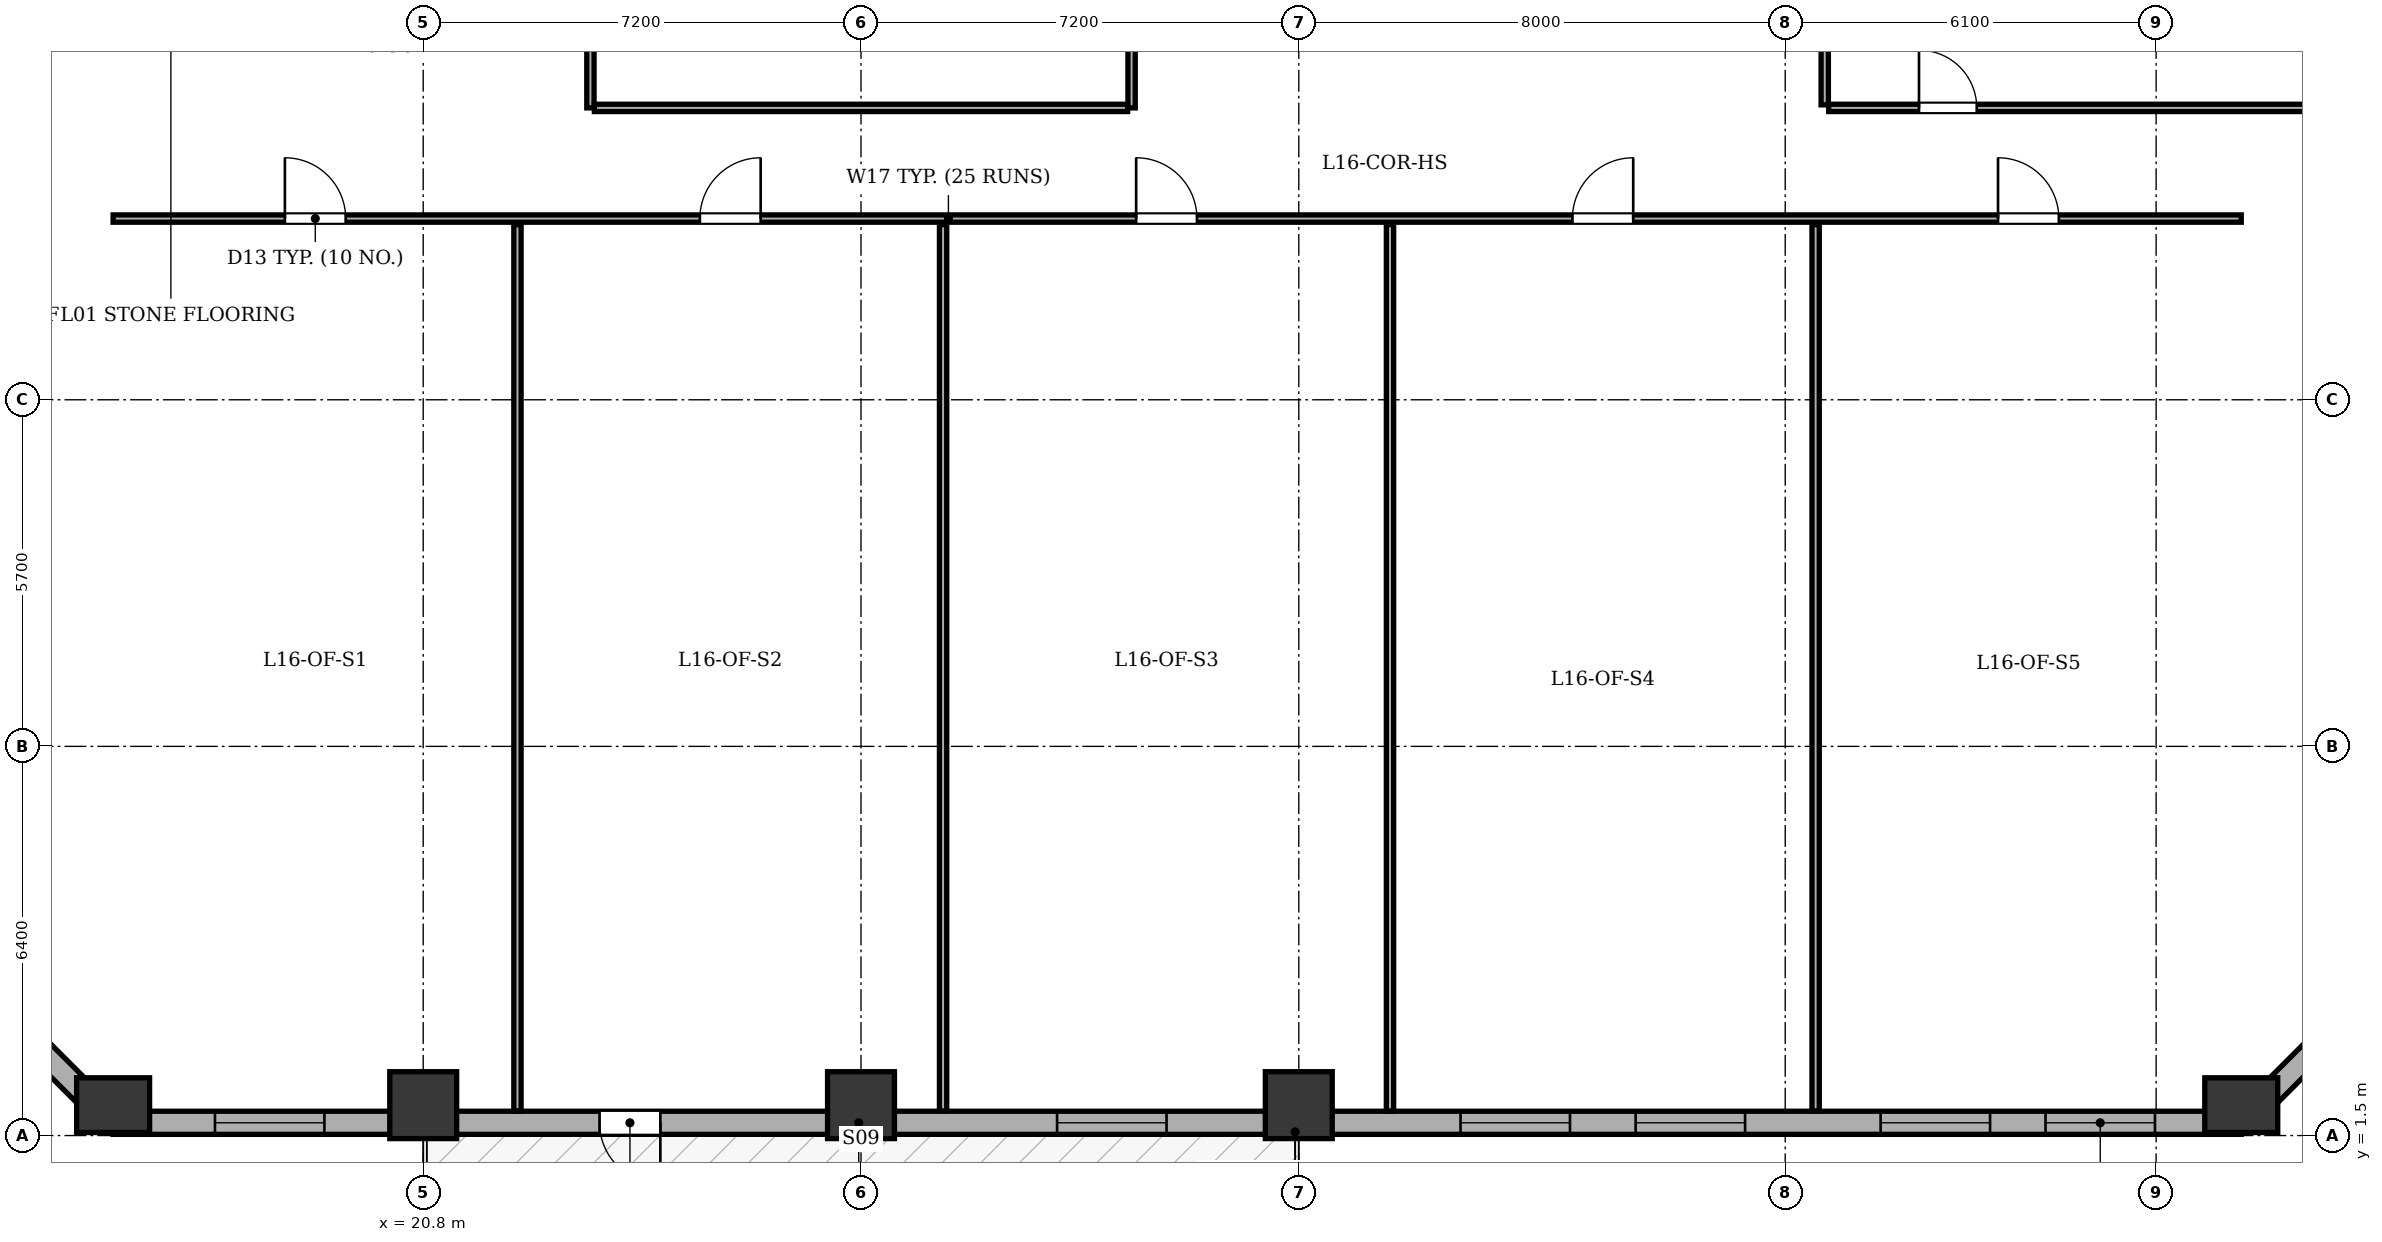
"""IFC4 building model, lengths in metres.
Left out: names, types, materials, properties, quantities, classifications, styles, units other than length and angle.
Written with IfcOpenShell. Run it as: python <this file> out.ifc"""

import sys

from ifc_helpers import new_model, si_unit, direction, frame, frame_2d, origin, origin_2d, place, context, subcontext, project, spatial, rectangle, extrude, element, fill, save


model = new_model("IFC4")
c1 = context("Model", 3, precision=1e-05, world=origin(), true_north=direction((0.0, 1.0)))
c2 = subcontext(c1, "Body", "Model", "MODEL_VIEW")
j1 = project(units=[si_unit("LENGTHUNIT", "METRE"), si_unit("PLANEANGLEUNIT", "RADIAN")], contexts=[c1])
p1 = place(None, origin())
s1 = spatial("IfcSite", under=j1, at=p1, CompositionType="ELEMENT")
p2 = place(p1, origin())
s2 = spatial("IfcBuilding", under=s1, at=p2, CompositionType="ELEMENT")
p3 = place(p2, frame((0.0, 0.0, 67.2)))
s3 = spatial("IfcBuildingStorey", under=s2, at=p3, CompositionType="ELEMENT", Elevation=67.2)
p4 = place(p3, frame((15.7, 2.0, 0.0), z_axis=(0.0, 0.0, 1.0), x_axis=(1.0, 0.0, 0.0)))
e1 = element("IfcColumn", 1, at=p4, inside=s3, PredefinedType="COLUMN", context=c2, shape_type="SweptSolid", body=[
    extrude(rectangle(XDim=0.9, YDim=1.2, at=origin_2d()), origin(), (0.0, 0.0, 1.0), 3.9),
])
for number, where, z_axis, x_axis in (
    (2, (20.8, 2.0, 0.0), (0.0, 0.0, 1.0), (1.0, 0.0, 0.0)),
    (3, (28.0, 2.0, 0.0), (0.0, 0.0, 1.0), (1.0, 0.0, 0.0)),
    (4, (35.2, 2.0, 0.0), (0.0, 0.0, 1.0), (1.0, 0.0, 0.0)),
):
    element("IfcColumn", number, at=place(p3, frame(where, z_axis=z_axis, x_axis=x_axis)), inside=s3, PredefinedType="COLUMN", context=c2, shape_type="SweptSolid", body=[
        extrude(rectangle(XDim=1.1, YDim=1.1, at=origin_2d()), origin(), (0.0, 0.0, 1.0), 3.9),
    ])
p5 = place(p3, frame((50.7, 2.0, 0.0), z_axis=(0.0, 0.0, 1.0), x_axis=(1.0, 0.0, 0.0)))
e5 = element("IfcColumn", 5, at=p5, inside=s3, PredefinedType="COLUMN", context=c2, shape_type="SweptSolid", body=[
    extrude(rectangle(XDim=0.9, YDim=1.2, at=origin_2d()), origin(), (0.0, 0.0, 1.0), 3.9),
])
p6 = place(p3, frame((50.7, 1.71, 0.0), z_axis=(0.0, 0.0, 1.0), x_axis=(-1.0, 0.0, 0.0)))
e6 = element("IfcWall", 6, at=p6, inside=s3, PredefinedType="STANDARD", context=c2, shape_type="SweptSolid", body=[
    extrude(rectangle(XDim=35.0, YDim=0.38, at=frame_2d((17.5, 0.0))), origin(), (0.0, 0.0, 1.0), 2.835),
])
p7 = place(p6, frame((26.0, 0.0, 0.0)))
e7 = element("IfcOpeningElement", 7, at=p7, cuts=e6, PredefinedType="OPENING", context=c2, shape_type="SweptSolid", body=[
    extrude(rectangle(XDim=1.0, YDim=2.02, at=frame_2d((0.5, 1.01))), frame((0.0, 0.2, 0.0), z_axis=(0.0, -1.0, 0.0), x_axis=(1.0, 0.0, 0.0)), (0.0, 0.0, 1.0), 0.4),
])
p8 = place(p6, frame((1.419, 0.0, 0.8)))
e8 = element("IfcOpeningElement", 8, at=p8, cuts=e6, PredefinedType="OPENING", context=c2, shape_type="SweptSolid", body=[
    extrude(rectangle(XDim=1.8, YDim=1.9, at=frame_2d((0.9, 0.95))), frame((0.0, 0.2, 0.0), z_axis=(0.0, -1.0, 0.0), x_axis=(1.0, 0.0, 0.0)), (0.0, 0.0, 1.0), 0.4),
])
p9 = place(p6, frame((4.131, 0.0, 0.8)))
e9 = element("IfcOpeningElement", 9, at=p9, cuts=e6, PredefinedType="OPENING", context=c2, shape_type="SweptSolid", body=[
    extrude(rectangle(XDim=1.8, YDim=1.9, at=frame_2d((0.9, 0.95))), frame((0.0, 0.2, 0.0), z_axis=(0.0, -1.0, 0.0), x_axis=(1.0, 0.0, 0.0)), (0.0, 0.0, 1.0), 0.4),
])
p10 = place(p6, frame((8.16, 0.0, 0.8)))
e10 = element("IfcOpeningElement", 10, at=p10, cuts=e6, PredefinedType="OPENING", context=c2, shape_type="SweptSolid", body=[
    extrude(rectangle(XDim=1.8, YDim=1.9, at=frame_2d((0.9, 0.95))), frame((0.0, 0.2, 0.0), z_axis=(0.0, -1.0, 0.0), x_axis=(1.0, 0.0, 0.0)), (0.0, 0.0, 1.0), 0.4),
])
p11 = place(p6, frame((11.04, 0.0, 0.8)))
e11 = element("IfcOpeningElement", 11, at=p11, cuts=e6, PredefinedType="OPENING", context=c2, shape_type="SweptSolid", body=[
    extrude(rectangle(XDim=1.8, YDim=1.9, at=frame_2d((0.9, 0.95))), frame((0.0, 0.2, 0.0), z_axis=(0.0, -1.0, 0.0), x_axis=(1.0, 0.0, 0.0)), (0.0, 0.0, 1.0), 0.4),
])
p12 = place(p6, frame((17.675, 0.0, 0.8)))
e12 = element("IfcOpeningElement", 12, at=p12, cuts=e6, PredefinedType="OPENING", context=c2, shape_type="SweptSolid", body=[
    extrude(rectangle(XDim=1.8, YDim=1.9, at=frame_2d((0.9, 0.95))), frame((0.0, 0.2, 0.0), z_axis=(0.0, -1.0, 0.0), x_axis=(1.0, 0.0, 0.0)), (0.0, 0.0, 1.0), 0.4),
])
p13 = place(p6, frame((31.525, 0.0, 0.8)))
e13 = element("IfcOpeningElement", 13, at=p13, cuts=e6, PredefinedType="OPENING", context=c2, shape_type="SweptSolid", body=[
    extrude(rectangle(XDim=1.8, YDim=1.9, at=frame_2d((0.9, 0.95))), frame((0.0, 0.2, 0.0), z_axis=(0.0, -1.0, 0.0), x_axis=(1.0, 0.0, 0.0)), (0.0, 0.0, 1.0), 0.4),
])
p14 = place(p3, frame((15.7, 1.71, 0.0), z_axis=(0.0, 0.0, 1.0), x_axis=(-0.707106781187, 0.707106781187, 0.0)))
e14 = element("IfcWall", 14, at=p14, inside=s3, PredefinedType="STANDARD", context=c2, shape_type="SweptSolid", body=[
    extrude(rectangle(XDim=6.774, YDim=0.38, at=frame_2d((3.387, 0.0))), origin(), (0.0, 0.0, 1.0), 2.835),
])
p15 = place(p14, frame((2.687, 0.0, 0.8)))
e15 = element("IfcOpeningElement", 15, at=p15, cuts=e14, PredefinedType="OPENING", context=c2, shape_type="SweptSolid", body=[
    extrude(rectangle(XDim=1.4, YDim=1.65, at=frame_2d((0.7, 0.825))), frame((0.0, 0.2, 0.0), z_axis=(0.0, -1.0, 0.0), x_axis=(1.0, 0.0, 0.0)), (0.0, 0.0, 1.0), 0.4),
])
p16 = place(p3, frame((55.49, 6.5, 0.0), z_axis=(0.0, 0.0, 1.0), x_axis=(-0.707106781187, -0.707106781187, 0.0)))
e16 = element("IfcWall", 16, at=p16, inside=s3, PredefinedType="STANDARD", context=c2, shape_type="SweptSolid", body=[
    extrude(rectangle(XDim=6.774, YDim=0.38, at=frame_2d((3.387, 0.0))), origin(), (0.0, 0.0, 1.0), 2.835),
])
p17 = place(p16, frame((2.687, 0.0, 0.8)))
e17 = element("IfcOpeningElement", 17, at=p17, cuts=e16, PredefinedType="OPENING", context=c2, shape_type="SweptSolid", body=[
    extrude(rectangle(XDim=1.4, YDim=1.65, at=frame_2d((0.7, 0.825))), frame((0.0, 0.2, 0.0), z_axis=(0.0, -1.0, 0.0), x_axis=(1.0, 0.0, 0.0)), (0.0, 0.0, 1.0), 0.4),
])
for number, where, z_axis, x_axis in (
    (18, (23.55, 18.4, 0.0), (0.0, 0.0, 1.0), (0.0, 1.0, 0.0)),
    (19, (32.45, 18.4, 0.0), (0.0, 0.0, 1.0), (0.0, 1.0, 0.0)),
):
    element("IfcWall", number, at=place(p3, frame(where, z_axis=z_axis, x_axis=x_axis)), inside=s3, PredefinedType="PARTITIONING", context=c2, shape_type="SweptSolid", body=[
        extrude(rectangle(XDim=3.485, YDim=0.12, at=frame_2d((1.743, 0.0))), origin(), (0.0, 0.0, 1.0), 3.45),
    ])
p18 = place(p3, frame((23.615, 18.4, 0.0), z_axis=(0.0, 0.0, 1.0), x_axis=(1.0, 0.0, 0.0)))
e20 = element("IfcWall", 20, at=p18, inside=s3, PredefinedType="PARTITIONING", context=c2, shape_type="SweptSolid", body=[
    extrude(rectangle(XDim=8.77, YDim=0.12, at=frame_2d((4.385, 0.0))), origin(), (0.0, 0.0, 1.0), 3.45),
])
p19 = place(p3, frame((15.7, 16.58, 0.0), z_axis=(0.0, 0.0, 1.0), x_axis=(1.0, 0.0, 0.0)))
e21 = element("IfcWall", 21, at=p19, inside=s3, PredefinedType="PARTITIONING", context=c2, shape_type="SweptSolid", body=[
    extrude(rectangle(XDim=35.0, YDim=0.12, at=frame_2d((17.5, 0.0))), origin(), (0.0, 0.0, 1.0), 3.45),
])
p20 = place(p19, frame((2.825, 0.0, 0.0)))
e22 = element("IfcOpeningElement", 22, at=p20, cuts=e21, PredefinedType="OPENING", context=c2, shape_type="SweptSolid", body=[
    extrude(rectangle(XDim=1.0, YDim=2.1, at=frame_2d((0.5, 1.05))), frame((0.0, 0.07, 0.0), z_axis=(0.0, -1.0, 0.0), x_axis=(1.0, 0.0, 0.0)), (0.0, 0.0, 1.0), 0.14),
])
p21 = place(p19, frame((9.65, 0.0, 0.0)))
e23 = element("IfcOpeningElement", 23, at=p21, cuts=e21, PredefinedType="OPENING", context=c2, shape_type="SweptSolid", body=[
    extrude(rectangle(XDim=1.0, YDim=2.1, at=frame_2d((0.5, 1.05))), frame((0.0, 0.07, 0.0), z_axis=(0.0, -1.0, 0.0), x_axis=(1.0, 0.0, 0.0)), (0.0, 0.0, 1.0), 0.14),
])
p22 = place(p19, frame((16.825, 0.0, 0.0)))
e24 = element("IfcOpeningElement", 24, at=p22, cuts=e21, PredefinedType="OPENING", context=c2, shape_type="SweptSolid", body=[
    extrude(rectangle(XDim=1.0, YDim=2.1, at=frame_2d((0.5, 1.05))), frame((0.0, 0.07, 0.0), z_axis=(0.0, -1.0, 0.0), x_axis=(1.0, 0.0, 0.0)), (0.0, 0.0, 1.0), 0.14),
])
p23 = place(p19, frame((24.0, 0.0, 0.0)))
e25 = element("IfcOpeningElement", 25, at=p23, cuts=e21, PredefinedType="OPENING", context=c2, shape_type="SweptSolid", body=[
    extrude(rectangle(XDim=1.0, YDim=2.1, at=frame_2d((0.5, 1.05))), frame((0.0, 0.07, 0.0), z_axis=(0.0, -1.0, 0.0), x_axis=(1.0, 0.0, 0.0)), (0.0, 0.0, 1.0), 0.14),
])
p24 = place(p19, frame((31.0, 0.0, 0.0)))
e26 = element("IfcOpeningElement", 26, at=p24, cuts=e21, PredefinedType="OPENING", context=c2, shape_type="SweptSolid", body=[
    extrude(rectangle(XDim=1.0, YDim=2.1, at=frame_2d((0.5, 1.05))), frame((0.0, 0.07, 0.0), z_axis=(0.0, -1.0, 0.0), x_axis=(1.0, 0.0, 0.0)), (0.0, 0.0, 1.0), 0.14),
])
p25 = place(p3, frame((22.35, 1.905, 0.0), z_axis=(0.0, 0.0, 1.0), x_axis=(0.0, 1.0, 0.0)))
e27 = element("IfcWall", 27, at=p25, inside=s3, PredefinedType="PARTITIONING", context=c2, shape_type="SweptSolid", body=[
    extrude(rectangle(XDim=14.575, YDim=0.12, at=frame_2d((7.288, 0.0))), origin(), (0.0, 0.0, 1.0), 2.885),
])
p26 = place(p3, frame((29.35, 1.905, 0.0), z_axis=(0.0, 0.0, 1.0), x_axis=(0.0, 1.0, 0.0)))
e28 = element("IfcWall", 28, at=p26, inside=s3, PredefinedType="PARTITIONING", context=c2, shape_type="SweptSolid", body=[
    extrude(rectangle(XDim=14.575, YDim=0.12, at=frame_2d((7.288, 0.0))), origin(), (0.0, 0.0, 1.0), 3.45),
])
p27 = place(p3, frame((36.7, 1.905, 0.0), z_axis=(0.0, 0.0, 1.0), x_axis=(0.0, 1.0, 0.0)))
e29 = element("IfcWall", 29, at=p27, inside=s3, PredefinedType="PARTITIONING", context=c2, shape_type="SweptSolid", body=[
    extrude(rectangle(XDim=14.575, YDim=0.12, at=frame_2d((7.288, 0.0))), origin(), (0.0, 0.0, 1.0), 2.885),
])
p28 = place(p3, frame((43.7, 1.905, 0.0), z_axis=(0.0, 0.0, 1.0), x_axis=(0.0, 1.0, 0.0)))
e30 = element("IfcWall", 30, at=p28, inside=s3, PredefinedType="PARTITIONING", context=c2, shape_type="SweptSolid", body=[
    extrude(rectangle(XDim=14.575, YDim=0.12, at=frame_2d((7.288, 0.0))), origin(), (0.0, 0.0, 1.0), 3.45),
])
p29 = place(p3, frame((43.85, 18.45, 0.0), z_axis=(0.0, 0.0, 1.0), x_axis=(0.0, 1.0, 0.0)))
e31 = element("IfcWall", 31, at=p29, inside=s3, PredefinedType="PARTITIONING", context=c2, shape_type="SweptSolid", body=[
    extrude(rectangle(XDim=17.5, YDim=0.12, at=frame_2d((8.75, 0.0))), origin(), (0.0, 0.0, 1.0), 3.45),
])
p30 = place(p3, frame((43.915, 18.4, 0.0), z_axis=(0.0, 0.0, 1.0), x_axis=(1.0, 0.0, 0.0)))
e32 = element("IfcWall", 32, at=p30, inside=s3, PredefinedType="PARTITIONING", context=c2, shape_type="SweptSolid", body=[
    extrude(rectangle(XDim=11.38, YDim=0.12, at=frame_2d((5.69, 0.0))), origin(), (0.0, 0.0, 1.0), 3.45),
])
p31 = place(p30, frame((1.485, 0.0, 0.0)))
e33 = element("IfcOpeningElement", 33, at=p31, cuts=e32, PredefinedType="OPENING", context=c2, shape_type="SweptSolid", body=[
    extrude(rectangle(XDim=0.95, YDim=2.1, at=frame_2d((0.475, 1.05))), frame((0.0, 0.07, 0.0), z_axis=(0.0, -1.0, 0.0), x_axis=(1.0, 0.0, 0.0)), (0.0, 0.0, 1.0), 0.14),
])
p32 = place(p7, origin())
e34 = element("IfcDoor", 34, at=p32, inside=s3, OperationType="SINGLE_SWING_LEFT", PredefinedType="DOOR", context=c2, shape_type="SweptSolid", body=[
    extrude(rectangle(XDim=1.0, YDim=2.02, at=frame_2d((0.5, 1.01))), frame((0.0, 0.025, 0.0), z_axis=(0.0, -1.0, 0.0), x_axis=(1.0, 0.0, 0.0)), (0.0, 0.0, 1.0), 0.05),
])
fill(e7, e34)
p33 = place(p8, origin())
e35 = element("IfcWindow", 35, at=p33, inside=s3, PartitioningType="SINGLE_PANEL", PredefinedType="WINDOW", context=c2, shape_type="SweptSolid", body=[
    extrude(rectangle(XDim=1.8, YDim=1.9, at=frame_2d((0.9, 0.95))), frame((0.0, -0.01, 0.0), z_axis=(0.0, -1.0, 0.0), x_axis=(1.0, 0.0, 0.0)), (0.0, 0.0, 1.0), 0.06),
])
fill(e8, e35)
p34 = place(p9, origin())
e36 = element("IfcWindow", 36, at=p34, inside=s3, PartitioningType="SINGLE_PANEL", PredefinedType="WINDOW", context=c2, shape_type="SweptSolid", body=[
    extrude(rectangle(XDim=1.8, YDim=1.9, at=frame_2d((0.9, 0.95))), frame((0.0, -0.01, 0.0), z_axis=(0.0, -1.0, 0.0), x_axis=(1.0, 0.0, 0.0)), (0.0, 0.0, 1.0), 0.06),
])
fill(e9, e36)
p35 = place(p10, origin())
e37 = element("IfcWindow", 37, at=p35, inside=s3, PartitioningType="SINGLE_PANEL", PredefinedType="WINDOW", context=c2, shape_type="SweptSolid", body=[
    extrude(rectangle(XDim=1.8, YDim=1.9, at=frame_2d((0.9, 0.95))), frame((0.0, -0.01, 0.0), z_axis=(0.0, -1.0, 0.0), x_axis=(1.0, 0.0, 0.0)), (0.0, 0.0, 1.0), 0.06),
])
fill(e10, e37)
p36 = place(p11, origin())
e38 = element("IfcWindow", 38, at=p36, inside=s3, PartitioningType="SINGLE_PANEL", PredefinedType="WINDOW", context=c2, shape_type="SweptSolid", body=[
    extrude(rectangle(XDim=1.8, YDim=1.9, at=frame_2d((0.9, 0.95))), frame((0.0, -0.01, 0.0), z_axis=(0.0, -1.0, 0.0), x_axis=(1.0, 0.0, 0.0)), (0.0, 0.0, 1.0), 0.06),
])
fill(e11, e38)
p37 = place(p12, origin())
e39 = element("IfcWindow", 39, at=p37, inside=s3, PartitioningType="SINGLE_PANEL", PredefinedType="WINDOW", context=c2, shape_type="SweptSolid", body=[
    extrude(rectangle(XDim=1.8, YDim=1.9, at=frame_2d((0.9, 0.95))), frame((0.0, -0.01, 0.0), z_axis=(0.0, -1.0, 0.0), x_axis=(1.0, 0.0, 0.0)), (0.0, 0.0, 1.0), 0.06),
])
fill(e12, e39)
p38 = place(p13, origin())
e40 = element("IfcWindow", 40, at=p38, inside=s3, PartitioningType="SINGLE_PANEL", PredefinedType="WINDOW", context=c2, shape_type="SweptSolid", body=[
    extrude(rectangle(XDim=1.8, YDim=1.9, at=frame_2d((0.9, 0.95))), frame((0.0, -0.01, 0.0), z_axis=(0.0, -1.0, 0.0), x_axis=(1.0, 0.0, 0.0)), (0.0, 0.0, 1.0), 0.06),
])
fill(e13, e40)
p39 = place(p20, origin())
e41 = element("IfcDoor", 41, at=p39, inside=s3, OperationType="SINGLE_SWING_LEFT", PredefinedType="DOOR", context=c2, shape_type="SweptSolid", body=[
    extrude(rectangle(XDim=1.0, YDim=2.1, at=frame_2d((0.5, 1.05))), frame((0.0, 0.025, 0.0), z_axis=(0.0, -1.0, 0.0), x_axis=(1.0, 0.0, 0.0)), (0.0, 0.0, 1.0), 0.05),
])
fill(e22, e41)
p40 = place(p21, origin())
e42 = element("IfcDoor", 42, at=p40, inside=s3, OperationType="SINGLE_SWING_RIGHT", PredefinedType="DOOR", context=c2, shape_type="SweptSolid", body=[
    extrude(rectangle(XDim=1.0, YDim=2.1, at=frame_2d((0.5, 1.05))), frame((0.0, 0.025, 0.0), z_axis=(0.0, -1.0, 0.0), x_axis=(1.0, 0.0, 0.0)), (0.0, 0.0, 1.0), 0.05),
])
fill(e23, e42)
p41 = place(p22, origin())
e43 = element("IfcDoor", 43, at=p41, inside=s3, OperationType="SINGLE_SWING_LEFT", PredefinedType="DOOR", context=c2, shape_type="SweptSolid", body=[
    extrude(rectangle(XDim=1.0, YDim=2.1, at=frame_2d((0.5, 1.05))), frame((0.0, 0.025, 0.0), z_axis=(0.0, -1.0, 0.0), x_axis=(1.0, 0.0, 0.0)), (0.0, 0.0, 1.0), 0.05),
])
fill(e24, e43)
p42 = place(p23, origin())
e44 = element("IfcDoor", 44, at=p42, inside=s3, OperationType="SINGLE_SWING_RIGHT", PredefinedType="DOOR", context=c2, shape_type="SweptSolid", body=[
    extrude(rectangle(XDim=1.0, YDim=2.1, at=frame_2d((0.5, 1.05))), frame((0.0, 0.025, 0.0), z_axis=(0.0, -1.0, 0.0), x_axis=(1.0, 0.0, 0.0)), (0.0, 0.0, 1.0), 0.05),
])
fill(e25, e44)
p43 = place(p24, origin())
e45 = element("IfcDoor", 45, at=p43, inside=s3, OperationType="SINGLE_SWING_LEFT", PredefinedType="DOOR", context=c2, shape_type="SweptSolid", body=[
    extrude(rectangle(XDim=1.0, YDim=2.1, at=frame_2d((0.5, 1.05))), frame((0.0, 0.025, 0.0), z_axis=(0.0, -1.0, 0.0), x_axis=(1.0, 0.0, 0.0)), (0.0, 0.0, 1.0), 0.05),
])
fill(e26, e45)
p44 = place(p31, origin())
e46 = element("IfcDoor", 46, at=p44, inside=s3, OperationType="SINGLE_SWING_LEFT", PredefinedType="DOOR", context=c2, shape_type="SweptSolid", body=[
    extrude(rectangle(XDim=0.95, YDim=2.1, at=frame_2d((0.475, 1.05))), frame((0.0, 0.025, 0.0), z_axis=(0.0, -1.0, 0.0), x_axis=(1.0, 0.0, 0.0)), (0.0, 0.0, 1.0), 0.05),
])
fill(e33, e46)
save(model, sys.argv[1])
